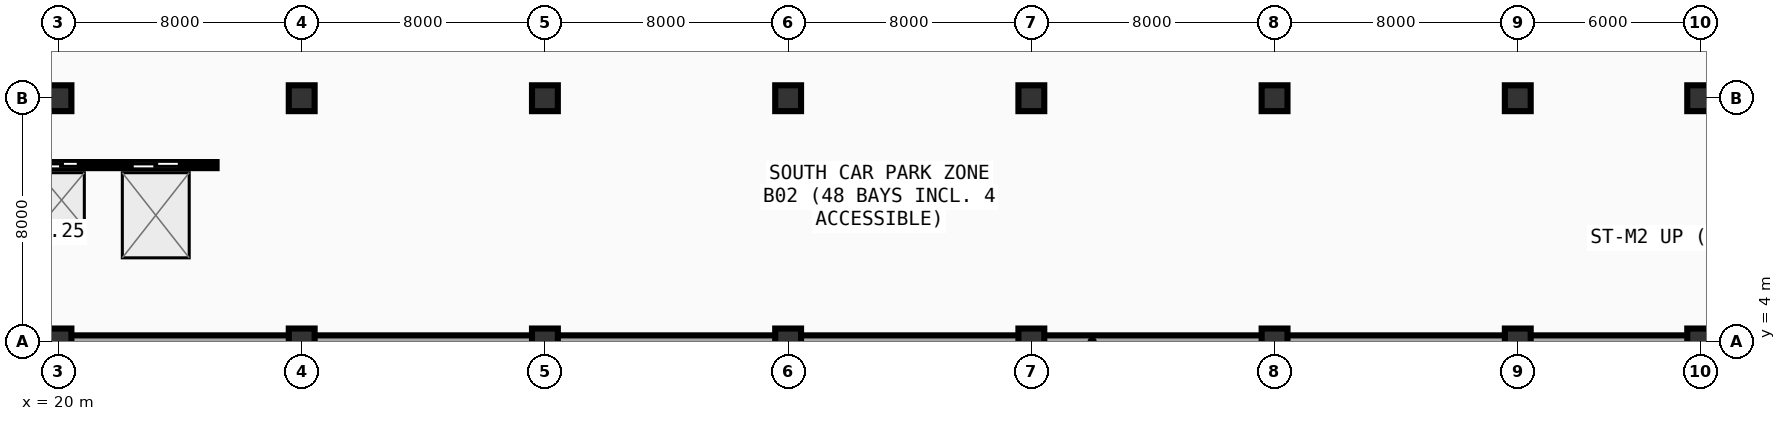
"""IFC4 building model, lengths in metres.
Left out: names, types, materials, properties, quantities, classifications, styles, units other than length and angle.
Written with IfcOpenShell. Run it as: python <this file> out.ifc"""

import sys

from ifc_helpers import new_model, si_unit, direction, frame, frame_2d, origin, origin_2d, place, context, subcontext, project, spatial, rectangle, extrude, element, fill, save


model = new_model("IFC4")
c1 = context("Model", 3, precision=1e-05, world=origin(), true_north=direction((0.0, 1.0)))
c2 = subcontext(c1, "Body", "Model", "MODEL_VIEW")
j1 = project(units=[si_unit("LENGTHUNIT", "METRE"), si_unit("PLANEANGLEUNIT", "RADIAN")], contexts=[c1])
p1 = place(None, origin())
s1 = spatial("IfcSite", under=j1, at=p1, CompositionType="ELEMENT")
p2 = place(p1, origin())
s2 = spatial("IfcBuilding", under=s1, at=p2, CompositionType="ELEMENT")
p3 = place(p2, frame((0.0, 0.0, -8.4)))
s3 = spatial("IfcBuildingStorey", under=s2, at=p3, CompositionType="ELEMENT", Elevation=-8.4)
for number, where, z_axis, x_axis in (
    (1, (20.0, 4.0, 0.0), (0.0, 0.0, 1.0), (1.0, 0.0, 0.0)),
    (2, (20.0, 12.0, 0.0), (0.0, 0.0, 1.0), (1.0, 0.0, 0.0)),
    (3, (28.0, 4.0, 0.0), (0.0, 0.0, 1.0), (1.0, 0.0, 0.0)),
    (4, (28.0, 12.0, 0.0), (0.0, 0.0, 1.0), (1.0, 0.0, 0.0)),
    (5, (36.0, 4.0, 0.0), (0.0, 0.0, 1.0), (1.0, 0.0, 0.0)),
    (6, (36.0, 12.0, 0.0), (0.0, 0.0, 1.0), (1.0, 0.0, 0.0)),
    (7, (44.0, 4.0, 0.0), (0.0, 0.0, 1.0), (1.0, 0.0, 0.0)),
    (8, (44.0, 12.0, 0.0), (0.0, 0.0, 1.0), (1.0, 0.0, 0.0)),
    (9, (52.0, 4.0, 0.0), (0.0, 0.0, 1.0), (1.0, 0.0, 0.0)),
    (10, (52.0, 12.0, 0.0), (0.0, 0.0, 1.0), (1.0, 0.0, 0.0)),
    (11, (60.0, 4.0, 0.0), (0.0, 0.0, 1.0), (1.0, 0.0, 0.0)),
    (12, (60.0, 12.0, 0.0), (0.0, 0.0, 1.0), (1.0, 0.0, 0.0)),
    (13, (68.0, 4.0, 0.0), (0.0, 0.0, 1.0), (1.0, 0.0, 0.0)),
    (14, (68.0, 12.0, 0.0), (0.0, 0.0, 1.0), (1.0, 0.0, 0.0)),
    (15, (74.0, 4.0, 0.0), (0.0, 0.0, 1.0), (1.0, 0.0, 0.0)),
    (16, (74.0, 12.0, 0.0), (0.0, 0.0, 1.0), (1.0, 0.0, 0.0)),
):
    element("IfcColumn", number, at=place(p3, frame(where, z_axis=z_axis, x_axis=x_axis)), inside=s3, PredefinedType="COLUMN", context=c2, shape_type="SweptSolid", body=[
        extrude(rectangle(XDim=0.85, YDim=0.85, at=origin_2d()), origin(), (0.0, 0.0, 1.0), 4.2),
    ])
p4 = place(p3, frame((4.55, 4.0, 0.0), z_axis=(0.0, 0.0, 1.0), x_axis=(1.0, 0.0, 0.0)))
e17 = element("IfcWall", 17, at=p4, inside=s3, PredefinedType="USERDEFINED", context=c2, shape_type="SweptSolid", body=[
    extrude(rectangle(XDim=98.9, YDim=0.4, at=frame_2d((49.45, 0.0))), origin(), (0.0, 0.0, 1.0), 3.9),
])
p5 = place(p3, frame((16.6, 9.8, 0.0), z_axis=(0.0, 0.0, 1.0), x_axis=(1.0, 0.0, 0.0)))
e18 = element("IfcWall", 18, at=p5, inside=s3, PredefinedType="SOLIDWALL", context=c2, shape_type="SweptSolid", body=[
    extrude(rectangle(XDim=8.6, YDim=0.2, at=frame_2d((4.3, 0.0))), origin(), (0.0, 0.0, 1.0), 2.685),
])
p6 = place(p5, frame((0.65, 0.0, 0.0)))
e19 = element("IfcOpeningElement", 19, at=p6, cuts=e18, PredefinedType="OPENING", context=c2, shape_type="SweptSolid", body=[
    extrude(rectangle(XDim=1.1, YDim=2.1, at=frame_2d((0.55, 1.05))), frame((0.0, 0.11, 0.0), z_axis=(0.0, -1.0, 0.0), x_axis=(1.0, 0.0, 0.0)), (0.0, 0.0, 1.0), 0.22),
])
p7 = place(p5, frame((2.95, 0.0, 0.0)))
e20 = element("IfcOpeningElement", 20, at=p7, cuts=e18, PredefinedType="OPENING", context=c2, shape_type="SweptSolid", body=[
    extrude(rectangle(XDim=1.1, YDim=2.1, at=frame_2d((0.55, 1.05))), frame((0.0, 0.11, 0.0), z_axis=(0.0, -1.0, 0.0), x_axis=(1.0, 0.0, 0.0)), (0.0, 0.0, 1.0), 0.22),
])
p8 = place(p5, frame((5.825, 0.0, 0.0)))
e21 = element("IfcOpeningElement", 21, at=p8, cuts=e18, PredefinedType="OPENING", context=c2, shape_type="SweptSolid", body=[
    extrude(rectangle(XDim=1.55, YDim=2.2, at=frame_2d((0.775, 1.1))), frame((0.0, 0.11, 0.0), z_axis=(0.0, -1.0, 0.0), x_axis=(1.0, 0.0, 0.0)), (0.0, 0.0, 1.0), 0.22),
])
p9 = place(p7, origin())
e22 = element("IfcDoor", 22, at=p9, inside=s3, OperationType="DOUBLE_DOOR_SLIDING", PredefinedType="DOOR", context=c2, shape_type="SweptSolid", body=[
    extrude(rectangle(XDim=1.1, YDim=2.1, at=frame_2d((0.55, 1.05))), frame((0.0, 0.025, 0.0), z_axis=(0.0, -1.0, 0.0), x_axis=(1.0, 0.0, 0.0)), (0.0, 0.0, 1.0), 0.05),
])
fill(e20, e22)
p10 = place(p8, origin())
e23 = element("IfcDoor", 23, at=p10, inside=s3, OperationType="DOUBLE_DOOR_SLIDING", PredefinedType="DOOR", context=c2, shape_type="SweptSolid", body=[
    extrude(rectangle(XDim=1.55, YDim=2.2, at=frame_2d((0.775, 1.1))), frame((0.0, 0.025, 0.0), z_axis=(0.0, -1.0, 0.0), x_axis=(1.0, 0.0, 0.0)), (0.0, 0.0, 1.0), 0.05),
])
fill(e21, e23)
save(model, sys.argv[1])
